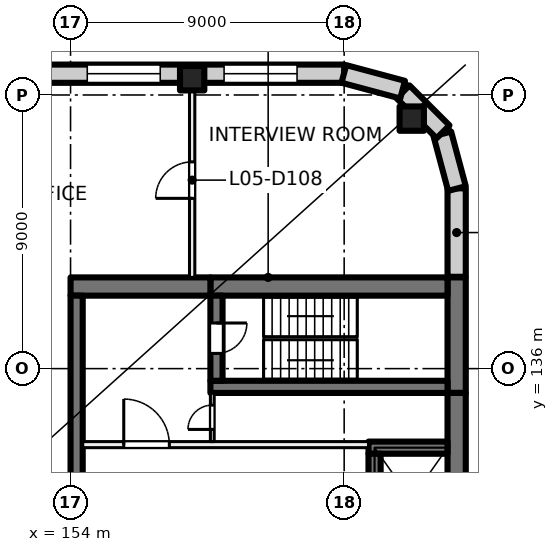
"""IFC4 building model, lengths in metres.
Left out: names, types, materials, properties, quantities, classifications, styles, units other than length and angle.
Written with IfcOpenShell. Run it as: python <this file> out.ifc"""

import sys

from ifc_helpers import new_model, si_unit, direction, frame, frame_2d, origin, origin_2d, place, context, subcontext, project, spatial, rectangle, extrude, element, fill, save


model = new_model("IFC4")
c1 = context("Model", 3, precision=1e-05, world=origin(), true_north=direction((0.0, 1.0)))
c2 = subcontext(c1, "Body", "Model", "MODEL_VIEW")
j1 = project(units=[si_unit("LENGTHUNIT", "METRE"), si_unit("PLANEANGLEUNIT", "RADIAN")], contexts=[c1])
p1 = place(None, origin())
s1 = spatial("IfcSite", under=j1, at=p1, CompositionType="ELEMENT")
p2 = place(p1, origin())
s2 = spatial("IfcBuilding", under=s1, at=p2, CompositionType="ELEMENT")
p3 = place(p2, frame((0.0, 0.0, 27.5)))
s3 = spatial("IfcBuildingStorey", under=s2, at=p3, CompositionType="ELEMENT", Elevation=27.5)
for number, where, z_axis, x_axis in (
    (1, (165.223, 144.223, 0.0), (0.0, 0.0, 1.0), (1.0, 0.0, 0.0)),
    (2, (158.0, 145.55, 0.0), (0.0, 0.0, 1.0), (1.0, 0.0, 0.0)),
):
    element("IfcColumn", number, at=place(p3, frame(where, z_axis=z_axis, x_axis=x_axis)), inside=s3, PredefinedType="COLUMN", context=c2, shape_type="SweptSolid", body=[
        extrude(rectangle(XDim=0.8, YDim=0.8, at=origin_2d()), origin(), (0.0, 0.0, 1.0), 4.0),
    ])
p4 = place(p3, frame((166.7, 139.0, 0.0), z_axis=(0.0, 0.0, 1.0), x_axis=(0.0, -1.0, 0.0)))
e3 = element("IfcWall", 3, at=p4, inside=s3, PredefinedType="SHEAR", context=c2, shape_type="SweptSolid", body=[
    extrude(rectangle(XDim=3.8, YDim=0.6, at=frame_2d((1.9, 0.0))), origin(), (0.0, 0.0, 1.0), 4.0),
])
p5 = place(p3, frame((166.7, 135.2, 0.0), z_axis=(0.0, 0.0, 1.0), x_axis=(0.0, -1.0, 0.0)))
e4 = element("IfcWall", 4, at=p5, inside=s3, PredefinedType="SHEAR", context=c2, shape_type="SweptSolid", body=[
    extrude(rectangle(XDim=14.4, YDim=0.6, at=frame_2d((7.2, 0.0))), origin(), (0.0, 0.0, 1.0), 4.0),
])
p6 = place(p3, frame((166.4, 138.7, 0.0), z_axis=(0.0, 0.0, 1.0), x_axis=(-1.0, 0.0, 0.0)))
e5 = element("IfcWall", 5, at=p6, inside=s3, PredefinedType="SHEAR", context=c2, shape_type="SweptSolid", body=[
    extrude(rectangle(XDim=7.8, YDim=0.6, at=frame_2d((3.9, 0.0))), origin(), (0.0, 0.0, 1.0), 4.0),
])
p7 = place(p3, frame((158.6, 138.7, 0.0), z_axis=(0.0, 0.0, 1.0), x_axis=(-1.0, 0.0, 0.0)))
e6 = element("IfcWall", 6, at=p7, inside=s3, PredefinedType="SHEAR", context=c2, shape_type="SweptSolid", body=[
    extrude(rectangle(XDim=4.6, YDim=0.6, at=frame_2d((2.3, 0.0))), origin(), (0.0, 0.0, 1.0), 4.0),
])
p8 = place(p3, frame((166.4, 135.4, 0.0), z_axis=(0.0, 0.0, 1.0), x_axis=(-1.0, 0.0, 0.0)))
e7 = element("IfcWall", 7, at=p8, inside=s3, PredefinedType="SHEAR", context=c2, shape_type="SweptSolid", body=[
    extrude(rectangle(XDim=7.8, YDim=0.4, at=frame_2d((3.9, 0.0))), origin(), (0.0, 0.0, 1.0), 4.0),
])
p9 = place(p3, frame((158.8, 138.4, 0.0), z_axis=(0.0, 0.0, 1.0), x_axis=(0.0, -1.0, 0.0)))
e8 = element("IfcWall", 8, at=p9, inside=s3, PredefinedType="SHEAR", context=c2, shape_type="SweptSolid", body=[
    extrude(rectangle(XDim=2.8, YDim=0.4, at=frame_2d((1.4, 0.0))), origin(), (0.0, 0.0, 1.0), 4.0),
])
p10 = place(p9, frame((0.9, 0.0, 0.0)))
e9 = element("IfcOpeningElement", 9, at=p10, cuts=e8, PredefinedType="OPENING", context=c2, shape_type="SweptSolid", body=[
    extrude(rectangle(XDim=1.0, YDim=2.1, at=frame_2d((0.5, 1.05))), frame((0.0, 0.21, 0.0), z_axis=(0.0, -1.0, 0.0), x_axis=(1.0, 0.0, 0.0)), (0.0, 0.0, 1.0), 0.42),
])
p11 = place(p3, frame((166.4, 133.4, 0.0), z_axis=(0.0, 0.0, 1.0), x_axis=(-1.0, 0.0, 0.0)))
e10 = element("IfcWall", 10, at=p11, inside=s3, PredefinedType="SHEAR", context=c2, shape_type="SweptSolid", body=[
    extrude(rectangle(XDim=2.6, YDim=0.4, at=frame_2d((1.3, 0.0))), origin(), (0.0, 0.0, 1.0), 4.0),
])
p12 = place(p3, frame((164.0, 133.2, 0.0), z_axis=(0.0, 0.0, 1.0), x_axis=(0.0, -1.0, 0.0)))
e11 = element("IfcWall", 11, at=p12, inside=s3, PredefinedType="SHEAR", context=c2, shape_type="SweptSolid", body=[
    extrude(rectangle(XDim=3.0, YDim=0.4, at=frame_2d((1.5, 0.0))), origin(), (0.0, 0.0, 1.0), 4.0),
])
p13 = place(p3, frame((154.2, 138.4, 0.0), z_axis=(0.0, 0.0, 1.0), x_axis=(0.0, -1.0, 0.0)))
e12 = element("IfcWall", 12, at=p13, inside=s3, PredefinedType="SHEAR", context=c2, shape_type="SweptSolid", body=[
    extrude(rectangle(XDim=8.6, YDim=0.4, at=frame_2d((4.3, 0.0))), origin(), (0.0, 0.0, 1.0), 4.0),
])
p14 = place(p3, frame((131.07, 145.7, 0.0), z_axis=(0.0, 0.0, 1.0), x_axis=(1.0, 0.0, 0.0)))
e13 = element("IfcWall", 13, at=p14, inside=s3, PredefinedType="SOLIDWALL", context=c2, shape_type="SweptSolid", body=[
    extrude(rectangle(XDim=31.93, YDim=0.6, at=frame_2d((15.965, 0.0))), origin(), (0.0, 0.0, 1.0), 3.625),
])
p15 = place(p14, frame((1.28, 0.0, 0.0)))
e14 = element("IfcOpeningElement", 14, at=p15, cuts=e13, PredefinedType="OPENING", context=c2, shape_type="SweptSolid", body=[
    extrude(rectangle(XDim=1.8, YDim=2.4, at=frame_2d((0.9, 1.2))), frame((0.0, 0.31, 0.0), z_axis=(0.0, -1.0, 0.0), x_axis=(1.0, 0.0, 0.0)), (0.0, 0.0, 1.0), 0.62),
])
p16 = place(p14, frame((5.48, 0.0, 0.9)))
e15 = element("IfcOpeningElement", 15, at=p16, cuts=e13, PredefinedType="OPENING", context=c2, shape_type="SweptSolid", body=[
    extrude(rectangle(XDim=2.4, YDim=2.4, at=frame_2d((1.2, 1.2))), frame((0.0, 0.31, 0.0), z_axis=(0.0, -1.0, 0.0), x_axis=(1.0, 0.0, 0.0)), (0.0, 0.0, 1.0), 0.62),
])
p17 = place(p14, frame((9.98, 0.0, 0.9)))
e16 = element("IfcOpeningElement", 16, at=p17, cuts=e13, PredefinedType="OPENING", context=c2, shape_type="SweptSolid", body=[
    extrude(rectangle(XDim=2.4, YDim=2.4, at=frame_2d((1.2, 1.2))), frame((0.0, 0.31, 0.0), z_axis=(0.0, -1.0, 0.0), x_axis=(1.0, 0.0, 0.0)), (0.0, 0.0, 1.0), 0.62),
])
p18 = place(p14, frame((14.48, 0.0, 0.9)))
e17 = element("IfcOpeningElement", 17, at=p18, cuts=e13, PredefinedType="OPENING", context=c2, shape_type="SweptSolid", body=[
    extrude(rectangle(XDim=2.4, YDim=2.4, at=frame_2d((1.2, 1.2))), frame((0.0, 0.31, 0.0), z_axis=(0.0, -1.0, 0.0), x_axis=(1.0, 0.0, 0.0)), (0.0, 0.0, 1.0), 0.62),
])
p19 = place(p14, frame((19.28, 0.0, 0.0)))
e18 = element("IfcOpeningElement", 18, at=p19, cuts=e13, PredefinedType="OPENING", context=c2, shape_type="SweptSolid", body=[
    extrude(rectangle(XDim=1.8, YDim=2.4, at=frame_2d((0.9, 1.2))), frame((0.0, 0.31, 0.0), z_axis=(0.0, -1.0, 0.0), x_axis=(1.0, 0.0, 0.0)), (0.0, 0.0, 1.0), 0.62),
])
p20 = place(p14, frame((23.48, 0.0, 0.9)))
e19 = element("IfcOpeningElement", 19, at=p20, cuts=e13, PredefinedType="OPENING", context=c2, shape_type="SweptSolid", body=[
    extrude(rectangle(XDim=2.4, YDim=2.4, at=frame_2d((1.2, 1.2))), frame((0.0, 0.31, 0.0), z_axis=(0.0, -1.0, 0.0), x_axis=(1.0, 0.0, 0.0)), (0.0, 0.0, 1.0), 0.62),
])
p21 = place(p14, frame((27.98, 0.0, 0.9)))
e20 = element("IfcOpeningElement", 20, at=p21, cuts=e13, PredefinedType="OPENING", context=c2, shape_type="SweptSolid", body=[
    extrude(rectangle(XDim=2.4, YDim=2.4, at=frame_2d((1.2, 1.2))), frame((0.0, 0.31, 0.0), z_axis=(0.0, -1.0, 0.0), x_axis=(1.0, 0.0, 0.0)), (0.0, 0.0, 1.0), 0.62),
])
p22 = place(p3, frame((166.7, 141.93, 0.0), z_axis=(0.0, 0.0, 1.0), x_axis=(0.0, -1.0, 0.0)))
e21 = element("IfcWall", 21, at=p22, inside=s3, PredefinedType="SOLIDWALL", context=c2, shape_type="SweptSolid", body=[
    extrude(rectangle(XDim=2.91, YDim=0.6, at=frame_2d((1.455, 0.0))), origin(), (0.0, 0.0, 1.0), 3.625),
])
for number, where, z_axis, x_axis in (
    (22, (166.229, 143.719, 0.0), (0.0, 0.0, 1.0), (0.259, -0.966, 0.0)),
    (23, (164.936, 145.104, 0.0), (0.0, 0.0, 1.0), (0.707, -0.707, 0.0)),
):
    element("IfcWall", number, at=place(p3, frame(where, z_axis=z_axis, x_axis=x_axis)), inside=s3, PredefinedType="SOLIDWALL", context=c2, shape_type="SweptSolid", body=[
        extrude(rectangle(XDim=1.861, YDim=0.6, at=frame_2d((0.93, 0.0))), origin(), (0.0, 0.0, 1.0), 3.625),
    ])
p23 = place(p3, frame((162.99, 145.692, 0.0), z_axis=(0.0, 0.0, 1.0), x_axis=(0.965920269068, -0.258839784042, 0.0)))
e24 = element("IfcWall", 24, at=p23, inside=s3, PredefinedType="SOLIDWALL", context=c2, shape_type="SweptSolid", body=[
    extrude(rectangle(XDim=2.0, YDim=0.6, at=frame_2d((1.0, 0.0))), origin(), (0.0, 0.0, 1.0), 3.625),
])
p24 = place(p3, frame((154.4, 133.5, 0.0), z_axis=(0.0, 0.0, 1.0), x_axis=(1.0, 0.0, 0.0)))
e25 = element("IfcWall", 25, at=p24, inside=s3, PredefinedType="PARTITIONING", context=c2, shape_type="SweptSolid", body=[
    extrude(rectangle(XDim=9.4, YDim=0.2, at=frame_2d((4.7, 0.0))), origin(), (0.0, 0.0, 1.0), 3.625),
])
p25 = place(p24, frame((1.35, 0.0, 0.0)))
e26 = element("IfcOpeningElement", 26, at=p25, cuts=e25, PredefinedType="OPENING", context=c2, shape_type="SweptSolid", body=[
    extrude(rectangle(XDim=1.5, YDim=2.1, at=frame_2d((0.75, 1.05))), frame((0.0, 0.11, 0.0), z_axis=(0.0, -1.0, 0.0), x_axis=(1.0, 0.0, 0.0)), (0.0, 0.0, 1.0), 0.22),
])
p26 = place(p3, frame((158.663, 133.6, 0.0), z_axis=(0.0, 0.0, 1.0), x_axis=(0.0, 1.0, 0.0)))
e27 = element("IfcWall", 27, at=p26, inside=s3, PredefinedType="PARTITIONING", context=c2, shape_type="SweptSolid", body=[
    extrude(rectangle(XDim=1.6, YDim=0.125, at=frame_2d((0.8, 0.0))), origin(), (0.0, 0.0, 1.0), 3.625),
])
p27 = place(p26, frame((0.4, 0.0, 0.0)))
e28 = element("IfcOpeningElement", 28, at=p27, cuts=e27, PredefinedType="OPENING", context=c2, shape_type="SweptSolid", body=[
    extrude(rectangle(XDim=0.8, YDim=2.1, at=frame_2d((0.4, 1.05))), frame((0.0, 0.073, 0.0), z_axis=(0.0, -1.0, 0.0), x_axis=(1.0, 0.0, 0.0)), (0.0, 0.0, 1.0), 0.145),
])
p28 = place(p3, frame((158.0, 139.0, 0.0), z_axis=(0.0, 0.0, 1.0), x_axis=(0.0, 1.0, 0.0)))
e29 = element("IfcWall", 29, at=p28, inside=s3, PredefinedType="PARTITIONING", context=c2, shape_type="SweptSolid", body=[
    extrude(rectangle(XDim=6.4, YDim=0.175, at=frame_2d((3.2, 0.0))), origin(), (0.0, 0.0, 1.0), 3.625),
])
p29 = place(p28, frame((2.6, 0.0, 0.0)))
e30 = element("IfcOpeningElement", 30, at=p29, cuts=e29, PredefinedType="OPENING", context=c2, shape_type="SweptSolid", body=[
    extrude(rectangle(XDim=1.2, YDim=2.1, at=frame_2d((0.6, 1.05))), frame((0.0, 0.097, 0.0), z_axis=(0.0, -1.0, 0.0), x_axis=(1.0, 0.0, 0.0)), (0.0, 0.0, 1.0), 0.195),
])
p30 = place(p20, origin())
e31 = element("IfcWindow", 31, at=p30, inside=s3, PartitioningType="SINGLE_PANEL", PredefinedType="WINDOW", context=c2, shape_type="SweptSolid", body=[
    extrude(rectangle(XDim=2.4, YDim=2.4, at=frame_2d((1.2, 1.2))), frame((0.0, 0.03, 0.0), z_axis=(0.0, -1.0, 0.0), x_axis=(1.0, 0.0, 0.0)), (0.0, 0.0, 1.0), 0.06),
])
fill(e19, e31)
p31 = place(p21, origin())
e32 = element("IfcWindow", 32, at=p31, inside=s3, PartitioningType="SINGLE_PANEL", PredefinedType="WINDOW", context=c2, shape_type="SweptSolid", body=[
    extrude(rectangle(XDim=2.4, YDim=2.4, at=frame_2d((1.2, 1.2))), frame((0.0, 0.03, 0.0), z_axis=(0.0, -1.0, 0.0), x_axis=(1.0, 0.0, 0.0)), (0.0, 0.0, 1.0), 0.06),
])
fill(e20, e32)
p32 = place(p25, origin())
e33 = element("IfcDoor", 33, at=p32, inside=s3, OperationType="DOUBLE_DOOR_SINGLE_SWING", PredefinedType="DOOR", context=c2, shape_type="SweptSolid", body=[
    extrude(rectangle(XDim=1.5, YDim=2.1, at=frame_2d((0.75, 1.05))), frame((0.0, 0.025, 0.0), z_axis=(0.0, -1.0, 0.0), x_axis=(1.0, 0.0, 0.0)), (0.0, 0.0, 1.0), 0.05),
])
fill(e26, e33)
p33 = place(p10, origin())
e34 = element("IfcDoor", 34, at=p33, inside=s3, OperationType="SINGLE_SWING_RIGHT", PredefinedType="DOOR", context=c2, shape_type="SweptSolid", body=[
    extrude(rectangle(XDim=1.0, YDim=2.1, at=frame_2d((0.5, 1.05))), frame((0.0, 0.025, 0.0), z_axis=(0.0, -1.0, 0.0), x_axis=(1.0, 0.0, 0.0)), (0.0, 0.0, 1.0), 0.05),
])
fill(e9, e34)
p34 = place(p27, origin())
e35 = element("IfcDoor", 35, at=p34, inside=s3, OperationType="SINGLE_SWING_LEFT", PredefinedType="DOOR", context=c2, shape_type="SweptSolid", body=[
    extrude(rectangle(XDim=0.8, YDim=2.1, at=frame_2d((0.4, 1.05))), frame((0.0, 0.025, 0.0), z_axis=(0.0, -1.0, 0.0), x_axis=(1.0, 0.0, 0.0)), (0.0, 0.0, 1.0), 0.05),
])
fill(e28, e35)
p35 = place(p29, origin())
e36 = element("IfcDoor", 36, at=p35, inside=s3, OperationType="DOUBLE_DOOR_SINGLE_SWING", PredefinedType="DOOR", context=c2, shape_type="SweptSolid", body=[
    extrude(rectangle(XDim=1.2, YDim=2.1, at=frame_2d((0.6, 1.05))), frame((0.0, 0.025, 0.0), z_axis=(0.0, -1.0, 0.0), x_axis=(1.0, 0.0, 0.0)), (0.0, 0.0, 1.0), 0.05),
])
fill(e30, e36)
save(model, sys.argv[1])
